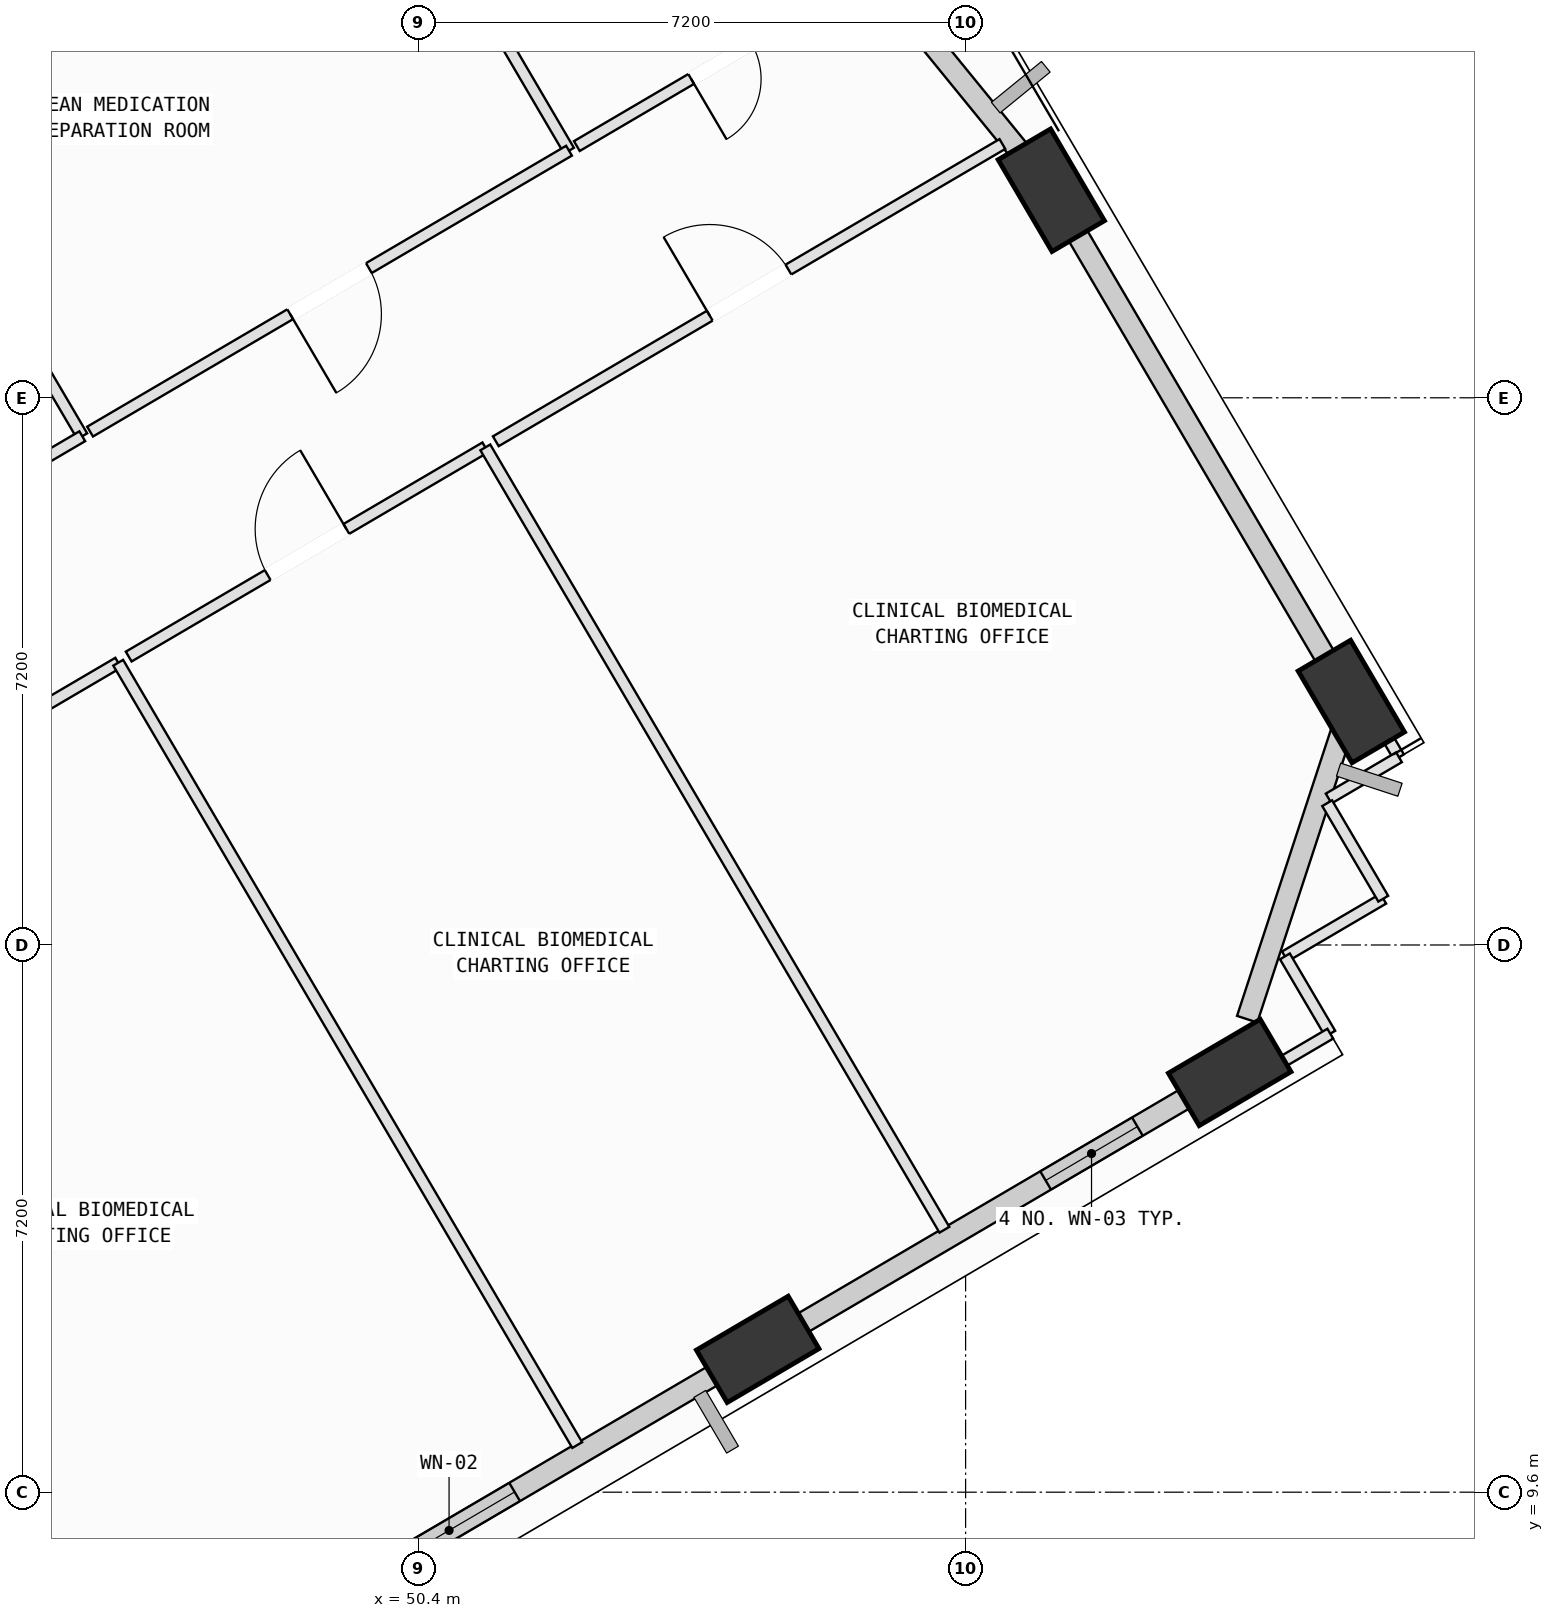
"""IFC4 building model, lengths in metres.
Left out: names, types, materials, properties, quantities, classifications, styles, units other than length and angle.
Written with IfcOpenShell. Run it as: python <this file> out.ifc"""

import sys

from ifc_helpers import new_model, si_unit, direction, frame, frame_2d, origin, origin_2d, place, context, subcontext, project, spatial, rectangle, extrude, element, fill, save


model = new_model("IFC4")
c1 = context("Model", 3, precision=1e-05, world=origin(), true_north=direction((0.0, 1.0)))
c2 = subcontext(c1, "Body", "Model", "MODEL_VIEW")
j1 = project(units=[si_unit("LENGTHUNIT", "METRE"), si_unit("PLANEANGLEUNIT", "RADIAN")], contexts=[c1])
p1 = place(None, origin())
s1 = spatial("IfcSite", under=j1, at=p1, CompositionType="ELEMENT")
p2 = place(p1, origin())
s2 = spatial("IfcBuilding", under=s1, at=p2, CompositionType="ELEMENT")
p3 = place(p2, frame((0.0, 0.0, 153.8)))
s3 = spatial("IfcBuildingStorey", under=s2, at=p3, CompositionType="ELEMENT", Elevation=153.8)
p4 = place(p3, frame((54.865, 11.479, 0.002), z_axis=(0.054200911199, 0.088106862375, 0.994635331178), x_axis=(-0.998358751435, 0.023231653621, 0.052345904364)))
e1 = element("IfcColumn", 1, at=p4, inside=s3, PredefinedType="COLUMN", context=c2, shape_type="SweptSolid", body=[
    extrude(rectangle(XDim=1.4, YDim=0.8, at=origin_2d()), origin(), (0.0, 0.0, 1.0), 4.018),
])
p5 = place(p3, frame((61.074, 15.123, 0.002), z_axis=(0.038937742609, 0.113356138531, 0.992791135163), x_axis=(-0.978939387648, -0.19493340453, 0.060651818678)))
e2 = element("IfcColumn", 2, at=p5, inside=s3, PredefinedType="COLUMN", context=c2, shape_type="SweptSolid", body=[
    extrude(rectangle(XDim=1.4, YDim=0.8, at=origin_2d()), origin(), (0.0, 0.0, 1.0), 4.025),
])
p6 = place(p3, frame((62.675, 20.003, 0.002), z_axis=(0.018737798515, 0.119824886295, 0.992618200282), x_axis=(0.367684063858, -0.924048637588, 0.104606618128)))
e3 = element("IfcColumn", 3, at=p6, inside=s3, PredefinedType="COLUMN", context=c2, shape_type="SweptSolid", body=[
    extrude(rectangle(XDim=1.4, YDim=0.8, at=origin_2d()), origin(), (0.0, 0.0, 1.0), 4.026),
])
p7 = place(p3, frame((58.728, 26.731, 0.002), z_axis=(-0.008810255612, 0.103535693532, 0.994586717969), x_axis=(0.576946050037, -0.811850264044, 0.089623680566)))
e4 = element("IfcColumn", 4, at=p7, inside=s3, PredefinedType="COLUMN", context=c2, shape_type="SweptSolid", body=[
    extrude(rectangle(XDim=1.4, YDim=0.8, at=origin_2d()), origin(), (0.0, 0.0, 1.0), 4.018),
])
p8 = place(p3, frame((54.603, 11.326, 0.0), z_axis=(0.0, 0.0, 1.0), x_axis=(-0.862523077898, -0.506017727055, 0.0)))
e5 = element("IfcWall", 5, at=p8, inside=s3, PredefinedType="SOLIDWALL", context=c2, shape_type="SweptSolid", body=[
    extrude(rectangle(XDim=6.218, YDim=0.28, at=frame_2d((3.109, 0.0))), origin(), (0.0, 0.0, 1.0), 3.165),
])
p9 = place(p8, frame((3.405, 0.0, 0.75)))
e6 = element("IfcOpeningElement", 6, at=p9, cuts=e5, PredefinedType="OPENING", context=c2, shape_type="SweptSolid", body=[
    extrude(rectangle(XDim=2.0, YDim=1.95, at=frame_2d((1.0, 0.975))), frame((0.0, 0.15, 0.0), z_axis=(0.0, -1.0, 0.0), x_axis=(1.0, 0.0, 0.0)), (0.0, 0.0, 1.0), 0.3),
])
p10 = place(p3, frame((60.827, 14.977, 0.0), z_axis=(0.0, 0.0, 1.0), x_axis=(-0.862513753674, -0.50603362015, 0.0)))
e7 = element("IfcWall", 7, at=p10, inside=s3, PredefinedType="SOLIDWALL", context=c2, shape_type="SweptSolid", body=[
    extrude(rectangle(XDim=6.242, YDim=0.28, at=frame_2d((3.121, 0.0))), origin(), (0.0, 0.0, 1.0), 3.165),
])
p11 = place(p10, frame((1.12, 0.0, 0.75)))
e8 = element("IfcOpeningElement", 8, at=p11, cuts=e7, PredefinedType="OPENING", context=c2, shape_type="SweptSolid", body=[
    extrude(rectangle(XDim=1.4, YDim=1.85, at=frame_2d((0.7, 0.925))), frame((0.0, 0.15, 0.0), z_axis=(0.0, -1.0, 0.0), x_axis=(1.0, 0.0, 0.0)), (0.0, 0.0, 1.0), 0.3),
])
p12 = place(p3, frame((62.596, 19.762, 0.0), z_axis=(0.0, 0.0, 1.0), x_axis=(-0.311576824248, -0.95022096514, 0.0)))
e9 = element("IfcWall", 9, at=p12, inside=s3, PredefinedType="SOLIDWALL", context=c2, shape_type="SweptSolid", body=[
    extrude(rectangle(XDim=4.145, YDim=0.28, at=frame_2d((2.073, 0.0))), origin(), (0.0, 0.0, 1.0), 3.165),
])
p13 = place(p3, frame((58.879, 26.473, 0.0), z_axis=(0.0, 0.0, 1.0), x_axis=(0.506019922132, -0.862521790105, 0.0)))
e10 = element("IfcWall", 10, at=p13, inside=s3, PredefinedType="SOLIDWALL", context=c2, shape_type="SweptSolid", body=[
    extrude(rectangle(XDim=6.84, YDim=0.28, at=frame_2d((3.42, 0.0))), origin(), (0.0, 0.0, 1.0), 3.165),
])
p14 = place(p3, frame((52.729, 34.088, 0.0), z_axis=(0.0, 0.0, 1.0), x_axis=(0.631897979665, -0.775051574603, 0.0)))
e11 = element("IfcWall", 11, at=p14, inside=s3, PredefinedType="SOLIDWALL", context=c2, shape_type="SweptSolid", body=[
    extrude(rectangle(XDim=8.838, YDim=0.28, at=frame_2d((4.419, 0.0))), origin(), (0.0, 0.0, 1.0), 3.165),
])
p15 = place(p3, frame((42.762, 28.61, 0.0), z_axis=(0.0, 0.0, 1.0), x_axis=(0.862502800913, 0.506052288224, 0.0)))
e12 = element("IfcWall", 12, at=p15, inside=s3, PredefinedType="SOLIDWALL", context=c2, shape_type="SweptSolid", body=[
    extrude(rectangle(XDim=4.499, YDim=0.28, at=frame_2d((2.25, 0.0))), origin(), (0.0, 0.0, 1.0), 3.145),
])
p16 = place(p15, frame((1.803, 0.0, 0.75)))
e13 = element("IfcOpeningElement", 13, at=p16, cuts=e12, PredefinedType="OPENING", context=c2, shape_type="SweptSolid", body=[
    extrude(rectangle(XDim=1.4, YDim=1.85, at=frame_2d((0.7, 0.925))), frame((0.0, 0.15, 0.0), z_axis=(0.0, -1.0, 0.0), x_axis=(1.0, 0.0, 0.0)), (0.0, 0.0, 1.0), 0.3),
])
p17 = place(p3, frame((39.344, 16.344, 0.0), z_axis=(0.0, 0.0, 1.0), x_axis=(0.862497317199, 0.506061634413, 0.0)))
e14 = element("IfcWall", 14, at=p17, inside=s3, PredefinedType="PARTITIONING", context=c2, shape_type="SweptSolid", body=[
    extrude(rectangle(XDim=8.24, YDim=0.15, at=frame_2d((4.12, 0.0))), origin(), (0.0, 0.0, 1.0), 3.78),
])
p18 = place(p17, frame((3.52, 0.0, 0.0)))
e15 = element("IfcOpeningElement", 15, at=p18, cuts=e14, PredefinedType="OPENING", context=c2, shape_type="SweptSolid", body=[
    extrude(rectangle(XDim=1.2, YDim=2.15, at=frame_2d((0.6, 1.075))), frame((0.0, 0.085, 0.0), z_axis=(0.0, -1.0, 0.0), x_axis=(1.0, 0.0, 0.0)), (0.0, 0.0, 1.0), 0.17),
])
p19 = place(p3, frame((46.451, 20.514, 0.0), z_axis=(0.0, 0.0, 1.0), x_axis=(0.506011364749, -0.86252681045, 0.0)))
e16 = element("IfcWall", 16, at=p19, inside=s3, PredefinedType="PARTITIONING", context=c2, shape_type="SweptSolid", body=[
    extrude(rectangle(XDim=11.935, YDim=0.15, at=frame_2d((5.967, 0.0))), origin(), (0.0, 0.0, 1.0), 3.415),
])
p20 = place(p3, frame((46.589, 20.595, 0.0), z_axis=(0.0, 0.0, 1.0), x_axis=(0.862575050657, 0.505929127433, 0.0)))
e17 = element("IfcWall", 17, at=p20, inside=s3, PredefinedType="PARTITIONING", context=c2, shape_type="SweptSolid", body=[
    extrude(rectangle(XDim=5.439, YDim=0.15, at=frame_2d((2.72, 0.0))), origin(), (0.0, 0.0, 1.0), 3.065),
])
p21 = place(p20, frame((2.12, 0.0, 0.0)))
e18 = element("IfcOpeningElement", 18, at=p21, cuts=e17, PredefinedType="OPENING", context=c2, shape_type="SweptSolid", body=[
    extrude(rectangle(XDim=1.2, YDim=2.15, at=frame_2d((0.6, 1.075))), frame((0.0, 0.085, 0.0), z_axis=(0.0, -1.0, 0.0), x_axis=(1.0, 0.0, 0.0)), (0.0, 0.0, 1.0), 0.17),
])
p22 = place(p3, frame((51.281, 23.347, 0.0), z_axis=(0.0, 0.0, 1.0), x_axis=(0.506072235551, -0.862491097, 0.0)))
e19 = element("IfcWall", 19, at=p22, inside=s3, PredefinedType="PARTITIONING", context=c2, shape_type="SweptSolid", body=[
    extrude(rectangle(XDim=11.935, YDim=0.15, at=frame_2d((5.968, 0.0))), origin(), (0.0, 0.0, 1.0), 3.78),
])
p23 = place(p3, frame((55.559, 11.62, 0.0), z_axis=(0.0, 0.0, 1.0), x_axis=(-0.862565795498, -0.505944906524, 0.0)))
e20 = element("IfcWall", 20, at=p23, inside=s3, PredefinedType="PARTITIONING", context=c2, shape_type="SweptSolid", body=[
    extrude(rectangle(XDim=0.973, YDim=0.15, at=frame_2d((0.486, 0.0))), origin(), (0.0, 0.0, 1.0), 3.165),
])
p24 = place(p3, frame((63.095, 17.409, 0.0), z_axis=(0.0, 0.0, 1.0), x_axis=(-0.86254858152, -0.50597425282, 0.0)))
e21 = element("IfcWall", 21, at=p24, inside=s3, PredefinedType="PARTITIONING", context=c2, shape_type="SweptSolid", body=[
    extrude(rectangle(XDim=1.5, YDim=0.15, at=frame_2d((0.75, 0.0))), origin(), (0.0, 0.0, 1.0), 3.78),
])
p25 = place(p3, frame((61.801, 16.65, 0.0), z_axis=(0.0, 0.0, 1.0), x_axis=(0.506250785242, -0.862386306966, 0.0)))
e22 = element("IfcWall", 22, at=p25, inside=s3, PredefinedType="PARTITIONING", context=c2, shape_type="SweptSolid", body=[
    extrude(rectangle(XDim=1.179, YDim=0.15, at=frame_2d((0.59, 0.0))), origin(), (0.0, 0.0, 1.0), 3.78),
])
p26 = place(p3, frame((62.398, 15.633, 0.0), z_axis=(0.0, 0.0, 1.0), x_axis=(-0.862395181282, -0.50623566775, 0.0)))
e23 = element("IfcWall", 23, at=p26, inside=s3, PredefinedType="PARTITIONING", context=c2, shape_type="SweptSolid", body=[
    extrude(rectangle(XDim=1.687, YDim=0.15, at=frame_2d((0.844, 0.0))), origin(), (0.0, 0.0, 1.0), 3.78),
])
p27 = place(p3, frame((51.419, 23.428, 0.0), z_axis=(0.0, 0.0, 1.0), x_axis=(0.862469746782, 0.506108620639, 0.0)))
e24 = element("IfcWall", 24, at=p27, inside=s3, PredefinedType="PARTITIONING", context=c2, shape_type="SweptSolid", body=[
    extrude(rectangle(XDim=7.728, YDim=0.15, at=frame_2d((3.864, 0.0))), origin(), (0.0, 0.0, 1.0), 3.065),
])
p28 = place(p27, frame((3.264, 0.0, 0.0)))
e25 = element("IfcOpeningElement", 25, at=p28, cuts=e24, PredefinedType="OPENING", context=c2, shape_type="SweptSolid", body=[
    extrude(rectangle(XDim=1.2, YDim=2.15, at=frame_2d((0.6, 1.075))), frame((0.0, 0.085, 0.0), z_axis=(0.0, -1.0, 0.0), x_axis=(1.0, 0.0, 0.0)), (0.0, 0.0, 1.0), 0.17),
])
p29 = place(p3, frame((58.526, 27.411, 0.0), z_axis=(0.0, 0.0, 1.0), x_axis=(0.506220551384, -0.86240405458, 0.0)))
e26 = element("IfcWall", 26, at=p29, inside=s3, PredefinedType="PARTITIONING", context=c2, shape_type="SweptSolid", body=[
    extrude(rectangle(XDim=0.988, YDim=0.15, at=frame_2d((0.494, 0.0))), origin(), (0.0, 0.0, 1.0), 3.165),
])
p30 = place(p3, frame((62.487, 20.659, 0.0), z_axis=(0.0, 0.0, 1.0), x_axis=(0.506065741171, -0.862494907587, 0.0)))
e27 = element("IfcWall", 27, at=p30, inside=s3, PredefinedType="PARTITIONING", context=c2, shape_type="SweptSolid", body=[
    extrude(rectangle(XDim=1.61, YDim=0.15, at=frame_2d((0.805, 0.0))), origin(), (0.0, 0.0, 1.0), 3.165),
])
p31 = place(p3, frame((63.302, 19.27, 0.0), z_axis=(0.0, 0.0, 1.0), x_axis=(-0.862413623719, -0.506204248918, 0.0)))
e28 = element("IfcWall", 28, at=p31, inside=s3, PredefinedType="PARTITIONING", context=c2, shape_type="SweptSolid", body=[
    extrude(rectangle(XDim=1.073, YDim=0.15, at=frame_2d((0.536, 0.0))), origin(), (0.0, 0.0, 1.0), 3.78),
])
p32 = place(p3, frame((62.357, 18.666, 0.0), z_axis=(0.0, 0.0, 1.0), x_axis=(0.506295344111, -0.86236014781, 0.0)))
e29 = element("IfcWall", 29, at=p32, inside=s3, PredefinedType="PARTITIONING", context=c2, shape_type="SweptSolid", body=[
    extrude(rectangle(XDim=1.458, YDim=0.15, at=frame_2d((0.729, 0.0))), origin(), (0.0, 0.0, 1.0), 3.78),
])
p33 = place(p3, frame((43.928, 26.987, 0.0), z_axis=(0.0, 0.0, 1.0), x_axis=(0.506147939122, -0.862446672973, 0.0)))
e30 = element("IfcWall", 30, at=p33, inside=s3, PredefinedType="PARTITIONING", context=c2, shape_type="SweptSolid", body=[
    extrude(rectangle(XDim=4.05, YDim=0.15, at=frame_2d((2.025, 0.0))), origin(), (0.0, 0.0, 1.0), 3.415),
])
p34 = place(p3, frame((45.978, 23.494, 0.0), z_axis=(0.0, 0.0, 1.0), x_axis=(-0.862551983002, -0.505968454175, 0.0)))
e31 = element("IfcWall", 31, at=p34, inside=s3, PredefinedType="PARTITIONING", context=c2, shape_type="SweptSolid", body=[
    extrude(rectangle(XDim=5.562, YDim=0.15, at=frame_2d((2.781, 0.0))), origin(), (0.0, 0.0, 1.0), 3.78),
])
p35 = place(p3, frame((49.384, 32.362, 0.0), z_axis=(0.0, 0.0, 1.0), x_axis=(0.505957393196, -0.862558471218, 0.0)))
e32 = element("IfcWall", 32, at=p35, inside=s3, PredefinedType="PARTITIONING", context=c2, shape_type="SweptSolid", body=[
    extrude(rectangle(XDim=5.926, YDim=0.15, at=frame_2d((2.963, 0.0))), origin(), (0.0, 0.0, 1.0), 3.78),
])
p36 = place(p3, frame((52.382, 27.251, 0.0), z_axis=(0.0, 0.0, 1.0), x_axis=(-0.862558161186, -0.50595792174, 0.0)))
e33 = element("IfcWall", 33, at=p36, inside=s3, PredefinedType="PARTITIONING", context=c2, shape_type="SweptSolid", body=[
    extrude(rectangle(XDim=7.305, YDim=0.15, at=frame_2d((3.652, 0.0))), origin(), (0.0, 0.0, 1.0), 3.78),
])
p37 = place(p36, frame((3.052, 0.0, 0.0)))
e34 = element("IfcOpeningElement", 34, at=p37, cuts=e33, PredefinedType="OPENING", context=c2, shape_type="SweptSolid", body=[
    extrude(rectangle(XDim=1.2, YDim=2.15, at=frame_2d((0.6, 1.075))), frame((0.0, 0.085, 0.0), z_axis=(0.0, -1.0, 0.0), x_axis=(1.0, 0.0, 0.0)), (0.0, 0.0, 1.0), 0.17),
])
p38 = place(p3, frame((56.287, 29.543, 0.0), z_axis=(0.0, 0.0, 1.0), x_axis=(-0.862480426049, -0.506090421449, 0.0)))
e35 = element("IfcWall", 35, at=p38, inside=s3, PredefinedType="PARTITIONING", context=c2, shape_type="SweptSolid", body=[
    extrude(rectangle(XDim=4.408, YDim=0.15, at=frame_2d((2.204, 0.0))), origin(), (0.0, 0.0, 1.0), 3.78),
])
p39 = place(p38, frame((1.744, 0.0, 0.0)))
e36 = element("IfcOpeningElement", 36, at=p39, cuts=e35, PredefinedType="OPENING", context=c2, shape_type="SweptSolid", body=[
    extrude(rectangle(XDim=0.92, YDim=2.1, at=frame_2d((0.46, 1.05))), frame((0.0, 0.085, 0.0), z_axis=(0.0, -1.0, 0.0), x_axis=(1.0, 0.0, 0.0)), (0.0, 0.0, 1.0), 0.17),
])
p40 = place(p9, origin())
e37 = element("IfcWindow", 37, at=p40, inside=s3, PartitioningType="SINGLE_PANEL", PredefinedType="WINDOW", context=c2, shape_type="SweptSolid", body=[
    extrude(rectangle(XDim=2.0, YDim=1.95, at=frame_2d((1.0, 0.975))), frame((0.0, 0.03, 0.0), z_axis=(0.0, -1.0, 0.0), x_axis=(1.0, 0.0, 0.0)), (0.0, 0.0, 1.0), 0.06),
])
fill(e6, e37)
p41 = place(p11, origin())
e38 = element("IfcWindow", 38, at=p41, inside=s3, PartitioningType="SINGLE_PANEL", PredefinedType="WINDOW", context=c2, shape_type="SweptSolid", body=[
    extrude(rectangle(XDim=1.4, YDim=1.85, at=frame_2d((0.7, 0.925))), frame((0.0, 0.03, 0.0), z_axis=(0.0, -1.0, 0.0), x_axis=(1.0, 0.0, 0.0)), (0.0, 0.0, 1.0), 0.06),
])
fill(e8, e38)
p42 = place(p21, origin())
e39 = element("IfcDoor", 39, at=p42, inside=s3, OperationType="SINGLE_SWING_RIGHT", PredefinedType="DOOR", context=c2, shape_type="SweptSolid", body=[
    extrude(rectangle(XDim=1.2, YDim=2.15, at=frame_2d((0.6, 1.075))), frame((0.0, 0.025, 0.0), z_axis=(0.0, -1.0, 0.0), x_axis=(1.0, 0.0, 0.0)), (0.0, 0.0, 1.0), 0.05),
])
fill(e18, e39)
p43 = place(p28, origin())
e40 = element("IfcDoor", 40, at=p43, inside=s3, OperationType="SINGLE_SWING_LEFT", PredefinedType="DOOR", context=c2, shape_type="SweptSolid", body=[
    extrude(rectangle(XDim=1.2, YDim=2.15, at=frame_2d((0.6, 1.075))), frame((0.0, 0.025, 0.0), z_axis=(0.0, -1.0, 0.0), x_axis=(1.0, 0.0, 0.0)), (0.0, 0.0, 1.0), 0.05),
])
fill(e25, e40)
p44 = place(p37, origin())
e41 = element("IfcDoor", 41, at=p44, inside=s3, OperationType="SINGLE_SWING_RIGHT", PredefinedType="DOOR", context=c2, shape_type="SweptSolid", body=[
    extrude(rectangle(XDim=1.2, YDim=2.15, at=frame_2d((0.6, 1.075))), frame((0.0, 0.025, 0.0), z_axis=(0.0, -1.0, 0.0), x_axis=(1.0, 0.0, 0.0)), (0.0, 0.0, 1.0), 0.05),
])
fill(e34, e41)
p45 = place(p39, origin())
e42 = element("IfcDoor", 42, at=p45, inside=s3, OperationType="SINGLE_SWING_RIGHT", PredefinedType="DOOR", context=c2, shape_type="SweptSolid", body=[
    extrude(rectangle(XDim=0.92, YDim=2.1, at=frame_2d((0.46, 1.05))), frame((0.0, 0.025, 0.0), z_axis=(0.0, -1.0, 0.0), x_axis=(1.0, 0.0, 0.0)), (0.0, 0.0, 1.0), 0.05),
])
fill(e36, e42)
save(model, sys.argv[1])
